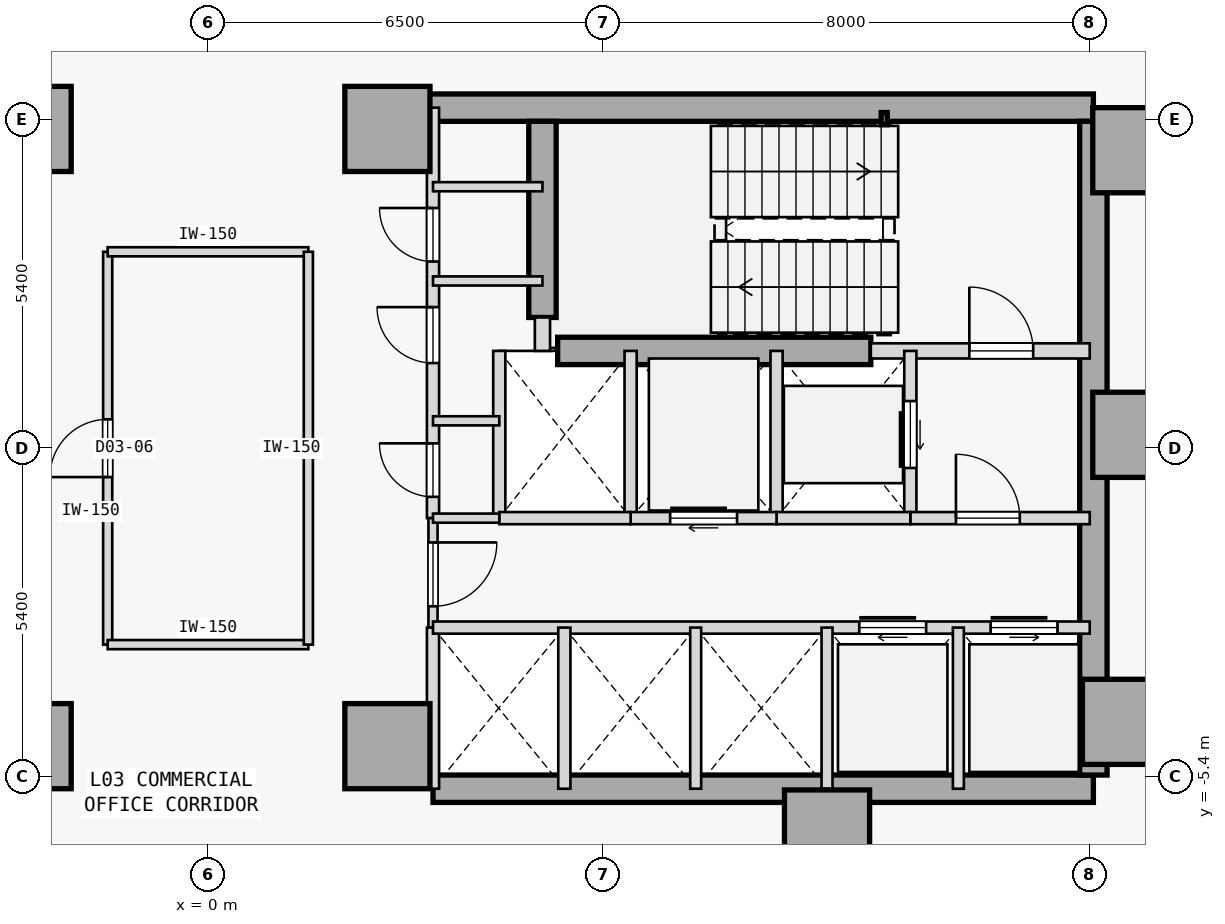
"""IFC4 building model, lengths in metres.
Left out: names, types, materials, properties, quantities, classifications, styles, units other than length and angle.
Written with IfcOpenShell. Run it as: python <this file> out.ifc"""

import sys

from ifc_helpers import new_model, si_unit, direction, frame, frame_2d, origin, origin_2d, place, context, subcontext, project, spatial, rectangle, hollow_rectangle, extrude, element, fill, save


model = new_model("IFC4")
c1 = context("Model", 3, precision=1e-05, world=origin(), true_north=direction((0.0, 1.0)))
c2 = subcontext(c1, "Body", "Model", "MODEL_VIEW")
j1 = project(units=[si_unit("LENGTHUNIT", "METRE"), si_unit("PLANEANGLEUNIT", "RADIAN")], contexts=[c1])
p1 = place(None, origin())
s1 = spatial("IfcSite", under=j1, at=p1, CompositionType="ELEMENT")
p2 = place(p1, origin())
s2 = spatial("IfcBuilding", under=s1, at=p2, CompositionType="ELEMENT")
p3 = place(p2, frame((0.0, 0.0, 18.0)))
s3 = spatial("IfcBuildingStorey", under=s2, at=p3, CompositionType="ELEMENT", Elevation=18.0)
for number, where, z_axis, x_axis in (
    (1, (-2.95, -4.9, 0.0), (0.0, 0.0, 1.0), (1.0, 0.0, 0.0)),
    (2, (-2.95, 5.25, 0.0), (0.0, 0.0, 1.0), (1.0, 0.0, 0.0)),
    (3, (15.25, 4.9, 0.0), (0.0, 0.0, 1.0), (1.0, 0.0, 0.0)),
    (4, (15.25, 0.22, 0.0), (0.0, 0.0, 1.0), (1.0, 0.0, 0.0)),
    (5, (15.08, -4.5, 0.0), (0.0, 0.0, 1.0), (1.0, 0.0, 0.0)),
    (6, (10.18, -6.32, 0.0), (0.0, 0.0, 1.0), (1.0, 0.0, 0.0)),
    (7, (2.95, -4.9, 0.0), (0.0, 0.0, 1.0), (1.0, 0.0, 0.0)),
    (8, (2.95, 5.25, 0.0), (0.0, 0.0, 1.0), (1.0, 0.0, 0.0)),
):
    element("IfcColumn", number, at=place(p3, frame(where, z_axis=z_axis, x_axis=x_axis)), inside=s3, PredefinedType="COLUMN", context=c2, shape_type="SweptSolid", body=[
        extrude(rectangle(XDim=1.4, YDim=1.4, at=origin_2d()), origin(), (0.0, 0.0, 1.0), 3.8),
    ])
p4 = place(p3, frame((3.15, 5.6, 0.0), z_axis=(0.0, 0.0, 1.0), x_axis=(1.0, 0.0, 0.0)))
e9 = element("IfcWall", 9, at=p4, inside=s3, PredefinedType="SHEAR", context=c2, shape_type="SweptSolid", body=[
    extrude(rectangle(XDim=11.41, YDim=0.45, at=frame_2d((5.705, 0.0))), origin(), (0.0, 0.0, 1.0), 3.575),
])
p5 = place(p3, frame((3.7, -5.6, 0.0), z_axis=(0.0, 0.0, 1.0), x_axis=(1.0, 0.0, 0.0)))
e10 = element("IfcWall", 10, at=p5, inside=s3, PredefinedType="SHEAR", context=c2, shape_type="SweptSolid", body=[
    extrude(rectangle(XDim=10.86, YDim=0.45, at=frame_2d((5.43, 0.0))), origin(), (0.0, 0.0, 1.0), 3.575),
])
p6 = place(p3, frame((14.56, -5.375, 0.0), z_axis=(0.0, 0.0, 1.0), x_axis=(0.0, 1.0, 0.0)))
e11 = element("IfcWall", 11, at=p6, inside=s3, PredefinedType="SHEAR", context=c2, shape_type="SweptSolid", body=[
    extrude(rectangle(XDim=10.75, YDim=0.45, at=frame_2d((5.375, 0.0))), origin(), (0.0, 0.0, 1.0), 3.575),
])
p7 = place(p3, frame((5.5, 2.15, 0.0), z_axis=(0.0, 0.0, 1.0), x_axis=(0.0, 1.0, 0.0)))
e12 = element("IfcWall", 12, at=p7, inside=s3, PredefinedType="SHEAR", context=c2, shape_type="SweptSolid", body=[
    extrude(rectangle(XDim=3.225, YDim=0.45, at=frame_2d((1.613, 0.0))), origin(), (0.0, 0.0, 1.0), 3.575),
])
p8 = place(p3, frame((5.75, 1.6, 0.0), z_axis=(0.0, 0.0, 1.0), x_axis=(1.0, 0.0, 0.0)))
e13 = element("IfcWall", 13, at=p8, inside=s3, PredefinedType="SHEAR", context=c2, shape_type="SweptSolid", body=[
    extrude(rectangle(XDim=5.15, YDim=0.45, at=frame_2d((2.575, 0.0))), origin(), (0.0, 0.0, 1.0), 3.575),
])
p9 = place(p3, frame((11.12, 5.42, 0.0), z_axis=(0.0, 0.0, 1.0), x_axis=(1.0, 0.0, 0.0)))
e14 = element("IfcColumn", 14, at=p9, inside=s3, PredefinedType="COLUMN", context=c2, shape_type="SweptSolid", body=[
    extrude(hollow_rectangle(XDim=0.1, YDim=0.2, WallThickness=0.008, at=origin_2d()), origin(), (0.0, 0.0, 1.0), 3.8),
])
p10 = place(p3, frame((10.9, 1.6, 0.0), z_axis=(0.0, 0.0, 1.0), x_axis=(1.0, 0.0, 0.0)))
e15 = element("IfcWall", 15, at=p10, inside=s3, PredefinedType="STANDARD", context=c2, shape_type="SweptSolid", body=[
    extrude(rectangle(XDim=3.6, YDim=0.25, at=frame_2d((1.8, 0.0))), origin(), (0.0, 0.0, 1.0), 3.575),
])
p11 = place(p10, frame((1.62, 0.0, 0.0)))
e16 = element("IfcOpeningElement", 16, at=p11, cuts=e15, PredefinedType="OPENING", context=c2, shape_type="SweptSolid", body=[
    extrude(rectangle(XDim=1.05, YDim=2.15, at=frame_2d((0.525, 1.075))), frame((0.0, 0.135, 0.0), z_axis=(0.0, -1.0, 0.0), x_axis=(1.0, 0.0, 0.0)), (0.0, 0.0, 1.0), 0.27),
])
p12 = place(p3, frame((5.5, 1.6, 0.0), z_axis=(0.0, 0.0, 1.0), x_axis=(0.0, 1.0, 0.0)))
e17 = element("IfcWall", 17, at=p12, inside=s3, PredefinedType="STANDARD", context=c2, shape_type="SweptSolid", body=[
    extrude(rectangle(XDim=0.55, YDim=0.25, at=frame_2d((0.275, 0.0))), origin(), (0.0, 0.0, 1.0), 3.575),
])
p13 = place(p3, frame((3.7, -1.15, 0.0), z_axis=(0.0, 0.0, 1.0), x_axis=(0.0, 1.0, 0.0)))
e18 = element("IfcWall", 18, at=p13, inside=s3, PredefinedType="STANDARD", context=c2, shape_type="SweptSolid", body=[
    extrude(rectangle(XDim=6.75, YDim=0.2, at=frame_2d((3.375, 0.0))), origin(), (0.0, 0.0, 1.0), 3.575),
])
p14 = place(p13, frame((0.35, 0.0, 0.0)))
e19 = element("IfcOpeningElement", 19, at=p14, cuts=e18, PredefinedType="OPENING", context=c2, shape_type="SweptSolid", body=[
    extrude(rectangle(XDim=0.88, YDim=2.15, at=frame_2d((0.44, 1.075))), frame((0.0, 0.11, 0.0), z_axis=(0.0, -1.0, 0.0), x_axis=(1.0, 0.0, 0.0)), (0.0, 0.0, 1.0), 0.22),
])
p15 = place(p13, frame((2.55, 0.0, 0.0)))
e20 = element("IfcOpeningElement", 20, at=p15, cuts=e18, PredefinedType="OPENING", context=c2, shape_type="SweptSolid", body=[
    extrude(rectangle(XDim=0.92, YDim=2.15, at=frame_2d((0.46, 1.075))), frame((0.0, 0.11, 0.0), z_axis=(0.0, -1.0, 0.0), x_axis=(1.0, 0.0, 0.0)), (0.0, 0.0, 1.0), 0.22),
])
p16 = place(p13, frame((4.22, 0.0, 0.0)))
e21 = element("IfcOpeningElement", 21, at=p16, cuts=e18, PredefinedType="OPENING", context=c2, shape_type="SweptSolid", body=[
    extrude(rectangle(XDim=0.88, YDim=2.15, at=frame_2d((0.44, 1.075))), frame((0.0, 0.11, 0.0), z_axis=(0.0, -1.0, 0.0), x_axis=(1.0, 0.0, 0.0)), (0.0, 0.0, 1.0), 0.22),
])
p17 = place(p3, frame((3.7, -2.95, 0.0), z_axis=(0.0, 0.0, 1.0), x_axis=(0.0, 1.0, 0.0)))
e22 = element("IfcWall", 22, at=p17, inside=s3, PredefinedType="PARTITIONING", context=c2, shape_type="SweptSolid", body=[
    extrude(rectangle(XDim=1.8, YDim=0.15, at=frame_2d((0.9, 0.0))), origin(), (0.0, 0.0, 1.0), 3.575),
])
p18 = place(p17, frame((0.35, 0.0, 0.0)))
e23 = element("IfcOpeningElement", 23, at=p18, cuts=e22, PredefinedType="OPENING", context=c2, shape_type="SweptSolid", body=[
    extrude(rectangle(XDim=1.05, YDim=2.18, at=frame_2d((0.525, 1.09))), frame((0.0, 0.085, 0.0), z_axis=(0.0, -1.0, 0.0), x_axis=(1.0, 0.0, 0.0)), (0.0, 0.0, 1.0), 0.17),
])
p19 = place(p3, frame((3.7, -5.6, 0.0), z_axis=(0.0, 0.0, 1.0), x_axis=(0.0, 1.0, 0.0)))
e24 = element("IfcWall", 24, at=p19, inside=s3, PredefinedType="STANDARD", context=c2, shape_type="SweptSolid", body=[
    extrude(rectangle(XDim=2.65, YDim=0.2, at=frame_2d((1.325, 0.0))), origin(), (0.0, 0.0, 1.0), 3.575),
])
p20 = place(p3, frame((11.55, -1.15, 0.0), z_axis=(0.0, 0.0, 1.0), x_axis=(0.0, 1.0, 0.0)))
e25 = element("IfcWall", 25, at=p20, inside=s3, PredefinedType="STANDARD", context=c2, shape_type="SweptSolid", body=[
    extrude(rectangle(XDim=2.75, YDim=0.2, at=frame_2d((1.375, 0.0))), origin(), (0.0, 0.0, 1.0), 3.575),
])
p21 = place(p20, frame((0.825, 0.0, 0.0)))
e26 = element("IfcOpeningElement", 26, at=p21, cuts=e25, PredefinedType="OPENING", context=c2, shape_type="SweptSolid", body=[
    extrude(rectangle(XDim=1.1, YDim=2.15, at=frame_2d((0.55, 1.075))), frame((0.0, 0.11, 0.0), z_axis=(0.0, -1.0, 0.0), x_axis=(1.0, 0.0, 0.0)), (0.0, 0.0, 1.0), 0.22),
])
p22 = place(p3, frame((9.35, -1.15, 0.0), z_axis=(0.0, 0.0, 1.0), x_axis=(0.0, 1.0, 0.0)))
e27 = element("IfcWall", 27, at=p22, inside=s3, PredefinedType="STANDARD", context=c2, shape_type="SweptSolid", body=[
    extrude(rectangle(XDim=2.75, YDim=0.2, at=frame_2d((1.375, 0.0))), origin(), (0.0, 0.0, 1.0), 3.575),
])
p23 = place(p3, frame((11.55, -1.15, 0.0), z_axis=(0.0, 0.0, 1.0), x_axis=(1.0, 0.0, 0.0)))
e28 = element("IfcWall", 28, at=p23, inside=s3, PredefinedType="STANDARD", context=c2, shape_type="SweptSolid", body=[
    extrude(rectangle(XDim=2.95, YDim=0.2, at=frame_2d((1.475, 0.0))), origin(), (0.0, 0.0, 1.0), 3.575),
])
p24 = place(p23, frame((0.75, 0.0, 0.0)))
e29 = element("IfcOpeningElement", 29, at=p24, cuts=e28, PredefinedType="OPENING", context=c2, shape_type="SweptSolid", body=[
    extrude(rectangle(XDim=1.05, YDim=2.18, at=frame_2d((0.525, 1.09))), frame((0.0, 0.11, 0.0), z_axis=(0.0, -1.0, 0.0), x_axis=(1.0, 0.0, 0.0)), (0.0, 0.0, 1.0), 0.22),
])
p25 = place(p3, frame((9.35, -1.15, 0.0), z_axis=(0.0, 0.0, 1.0), x_axis=(1.0, 0.0, 0.0)))
e30 = element("IfcWall", 30, at=p25, inside=s3, PredefinedType="STANDARD", context=c2, shape_type="SweptSolid", body=[
    extrude(rectangle(XDim=2.2, YDim=0.2, at=frame_2d((1.1, 0.0))), origin(), (0.0, 0.0, 1.0), 3.575),
])
p26 = place(p3, frame((6.95, -1.15, 0.0), z_axis=(0.0, 0.0, 1.0), x_axis=(0.0, 1.0, 0.0)))
e31 = element("IfcWall", 31, at=p26, inside=s3, PredefinedType="STANDARD", context=c2, shape_type="SweptSolid", body=[
    extrude(rectangle(XDim=2.75, YDim=0.2, at=frame_2d((1.375, 0.0))), origin(), (0.0, 0.0, 1.0), 3.575),
])
p27 = place(p3, frame((6.95, -1.15, 0.0), z_axis=(0.0, 0.0, 1.0), x_axis=(1.0, 0.0, 0.0)))
e32 = element("IfcWall", 32, at=p27, inside=s3, PredefinedType="STANDARD", context=c2, shape_type="SweptSolid", body=[
    extrude(rectangle(XDim=2.4, YDim=0.2, at=frame_2d((1.2, 0.0))), origin(), (0.0, 0.0, 1.0), 3.575),
])
p28 = place(p27, frame((0.65, 0.0, 0.0)))
e33 = element("IfcOpeningElement", 33, at=p28, cuts=e32, PredefinedType="OPENING", context=c2, shape_type="SweptSolid", body=[
    extrude(rectangle(XDim=1.1, YDim=2.15, at=frame_2d((0.55, 1.075))), frame((0.0, 0.11, 0.0), z_axis=(0.0, -1.0, 0.0), x_axis=(1.0, 0.0, 0.0)), (0.0, 0.0, 1.0), 0.22),
])
p29 = place(p3, frame((4.79, -1.15, 0.0), z_axis=(0.0, 0.0, 1.0), x_axis=(0.0, 1.0, 0.0)))
e34 = element("IfcWall", 34, at=p29, inside=s3, PredefinedType="STANDARD", context=c2, shape_type="SweptSolid", body=[
    extrude(rectangle(XDim=2.75, YDim=0.2, at=frame_2d((1.375, 0.0))), origin(), (0.0, 0.0, 1.0), 3.575),
])
p30 = place(p3, frame((4.79, -1.15, 0.0), z_axis=(0.0, 0.0, 1.0), x_axis=(1.0, 0.0, 0.0)))
e35 = element("IfcWall", 35, at=p30, inside=s3, PredefinedType="STANDARD", context=c2, shape_type="SweptSolid", body=[
    extrude(rectangle(XDim=2.16, YDim=0.2, at=frame_2d((1.08, 0.0))), origin(), (0.0, 0.0, 1.0), 3.575),
])
p31 = place(p3, frame((3.7, -1.15, 0.0), z_axis=(0.0, 0.0, 1.0), x_axis=(1.0, 0.0, 0.0)))
e36 = element("IfcWall", 36, at=p31, inside=s3, PredefinedType="PARTITIONING", context=c2, shape_type="SweptSolid", body=[
    extrude(rectangle(XDim=1.09, YDim=0.15, at=frame_2d((0.545, 0.0))), origin(), (0.0, 0.0, 1.0), 3.575),
])
p32 = place(p3, frame((3.7, -2.95, 0.0), z_axis=(0.0, 0.0, 1.0), x_axis=(1.0, 0.0, 0.0)))
e37 = element("IfcWall", 37, at=p32, inside=s3, PredefinedType="STANDARD", context=c2, shape_type="SweptSolid", body=[
    extrude(rectangle(XDim=10.8, YDim=0.2, at=frame_2d((5.4, 0.0))), origin(), (0.0, 0.0, 1.0), 3.575),
])
p33 = place(p32, frame((7.01, 0.0, 0.0)))
e38 = element("IfcOpeningElement", 38, at=p33, cuts=e37, PredefinedType="OPENING", context=c2, shape_type="SweptSolid", body=[
    extrude(rectangle(XDim=1.1, YDim=2.15, at=frame_2d((0.55, 1.075))), frame((0.0, 0.11, 0.0), z_axis=(0.0, -1.0, 0.0), x_axis=(1.0, 0.0, 0.0)), (0.0, 0.0, 1.0), 0.22),
])
p34 = place(p32, frame((9.17, 0.0, 0.0)))
e39 = element("IfcOpeningElement", 39, at=p34, cuts=e37, PredefinedType="OPENING", context=c2, shape_type="SweptSolid", body=[
    extrude(rectangle(XDim=1.1, YDim=2.15, at=frame_2d((0.55, 1.075))), frame((0.0, 0.11, 0.0), z_axis=(0.0, -1.0, 0.0), x_axis=(1.0, 0.0, 0.0)), (0.0, 0.0, 1.0), 0.22),
])
p35 = place(p3, frame((5.86, -5.6, 0.0), z_axis=(0.0, 0.0, 1.0), x_axis=(0.0, 1.0, 0.0)))
e40 = element("IfcWall", 40, at=p35, inside=s3, PredefinedType="STANDARD", context=c2, shape_type="SweptSolid", body=[
    extrude(rectangle(XDim=2.65, YDim=0.2, at=frame_2d((1.325, 0.0))), origin(), (0.0, 0.0, 1.0), 3.575),
])
for number, where, z_axis, x_axis in (
    (41, (12.34, -5.6, 0.0), (0.0, 0.0, 1.0), (0.0, 1.0, 0.0)),
    (42, (10.18, -5.6, 0.0), (0.0, 0.0, 1.0), (0.0, 1.0, 0.0)),
    (43, (8.02, -5.6, 0.0), (0.0, 0.0, 1.0), (0.0, 1.0, 0.0)),
):
    element("IfcWall", number, at=place(p3, frame(where, z_axis=z_axis, x_axis=x_axis)), inside=s3, PredefinedType="STANDARD", context=c2, shape_type="SweptSolid", body=[
        extrude(rectangle(XDim=2.65, YDim=0.18, at=frame_2d((1.325, 0.0))), origin(), (0.0, 0.0, 1.0), 3.575),
    ])
p36 = place(p3, frame((3.7, 4.3, 0.0), z_axis=(0.0, 0.0, 1.0), x_axis=(1.0, 0.0, 0.0)))
e44 = element("IfcWall", 44, at=p36, inside=s3, PredefinedType="PARTITIONING", context=c2, shape_type="SweptSolid", body=[
    extrude(rectangle(XDim=1.8, YDim=0.15, at=frame_2d((0.9, 0.0))), origin(), (0.0, 0.0, 1.0), 3.575),
])
p37 = place(p3, frame((3.7, 0.45, 0.0), z_axis=(0.0, 0.0, 1.0), x_axis=(1.0, 0.0, 0.0)))
e45 = element("IfcWall", 45, at=p37, inside=s3, PredefinedType="PARTITIONING", context=c2, shape_type="SweptSolid", body=[
    extrude(rectangle(XDim=1.09, YDim=0.15, at=frame_2d((0.545, 0.0))), origin(), (0.0, 0.0, 1.0), 3.575),
])
p38 = place(p3, frame((3.7, 2.75, 0.0), z_axis=(0.0, 0.0, 1.0), x_axis=(1.0, 0.0, 0.0)))
e46 = element("IfcWall", 46, at=p38, inside=s3, PredefinedType="PARTITIONING", context=c2, shape_type="SweptSolid", body=[
    extrude(rectangle(XDim=1.8, YDim=0.15, at=frame_2d((0.9, 0.0))), origin(), (0.0, 0.0, 1.0), 3.575),
])
p39 = place(p3, frame((-1.65, -3.23, 0.0), z_axis=(0.0, 0.0, 1.0), x_axis=(0.0, 1.0, 0.0)))
e47 = element("IfcWall", 47, at=p39, inside=s3, PredefinedType="PARTITIONING", context=c2, shape_type="SweptSolid", body=[
    extrude(rectangle(XDim=6.46, YDim=0.15, at=frame_2d((3.23, 0.0))), origin(), (0.0, 0.0, 1.0), 3.575),
])
p40 = place(p39, frame((2.755, 0.0, 0.0)))
e48 = element("IfcOpeningElement", 48, at=p40, cuts=e47, PredefinedType="OPENING", context=c2, shape_type="SweptSolid", body=[
    extrude(rectangle(XDim=0.95, YDim=2.15, at=frame_2d((0.475, 1.075))), frame((0.0, 0.085, 0.0), z_axis=(0.0, -1.0, 0.0), x_axis=(1.0, 0.0, 0.0)), (0.0, 0.0, 1.0), 0.17),
])
for number, where, z_axis, x_axis in (
    (49, (-1.65, -3.23, 0.0), (0.0, 0.0, 1.0), (1.0, 0.0, 0.0)),
    (50, (-1.65, 3.23, 0.0), (0.0, 0.0, 1.0), (1.0, 0.0, 0.0)),
):
    element("IfcWall", number, at=place(p3, frame(where, z_axis=z_axis, x_axis=x_axis)), inside=s3, PredefinedType="PARTITIONING", context=c2, shape_type="SweptSolid", body=[
        extrude(rectangle(XDim=3.3, YDim=0.15, at=frame_2d((1.65, 0.0))), origin(), (0.0, 0.0, 1.0), 3.575),
    ])
p41 = place(p3, frame((1.65, -3.23, 0.0), z_axis=(0.0, 0.0, 1.0), x_axis=(0.0, 1.0, 0.0)))
e51 = element("IfcWall", 51, at=p41, inside=s3, PredefinedType="PARTITIONING", context=c2, shape_type="SweptSolid", body=[
    extrude(rectangle(XDim=6.46, YDim=0.15, at=frame_2d((3.23, 0.0))), origin(), (0.0, 0.0, 1.0), 3.575),
])
p42 = place(p11, origin())
e52 = element("IfcDoor", 52, at=p42, inside=s3, OperationType="SINGLE_SWING_LEFT", PredefinedType="DOOR", context=c2, shape_type="SweptSolid", body=[
    extrude(rectangle(XDim=1.05, YDim=2.15, at=frame_2d((0.525, 1.075))), frame((0.0, 0.025, 0.0), z_axis=(0.0, -1.0, 0.0), x_axis=(1.0, 0.0, 0.0)), (0.0, 0.0, 1.0), 0.05),
])
fill(e16, e52)
p43 = place(p24, origin())
e53 = element("IfcDoor", 53, at=p43, inside=s3, OperationType="SINGLE_SWING_LEFT", PredefinedType="DOOR", context=c2, shape_type="SweptSolid", body=[
    extrude(rectangle(XDim=1.05, YDim=2.18, at=frame_2d((0.525, 1.09))), frame((0.0, 0.025, 0.0), z_axis=(0.0, -1.0, 0.0), x_axis=(1.0, 0.0, 0.0)), (0.0, 0.0, 1.0), 0.05),
])
fill(e29, e53)
p44 = place(p18, frame((1.05, 0.0, 0.0), z_axis=(0.0, 0.0, 1.0), x_axis=(-1.0, 0.0, 0.0)))
e54 = element("IfcDoor", 54, at=p44, inside=s3, OperationType="SINGLE_SWING_RIGHT", PredefinedType="DOOR", context=c2, shape_type="SweptSolid", body=[
    extrude(rectangle(XDim=1.05, YDim=2.18, at=frame_2d((0.525, 1.09))), frame((0.0, 0.025, 0.0), z_axis=(0.0, -1.0, 0.0), x_axis=(1.0, 0.0, 0.0)), (0.0, 0.0, 1.0), 0.05),
])
fill(e23, e54)
p45 = place(p21, origin())
e55 = element("IfcDoor", 55, at=p45, inside=s3, OperationType="SLIDING_TO_RIGHT", PredefinedType="DOOR", context=c2, shape_type="SweptSolid", body=[
    extrude(rectangle(XDim=1.1, YDim=2.15, at=frame_2d((0.55, 1.075))), frame((0.0, 0.025, 0.0), z_axis=(0.0, -1.0, 0.0), x_axis=(1.0, 0.0, 0.0)), (0.0, 0.0, 1.0), 0.05),
])
fill(e26, e55)
p46 = place(p28, origin())
e56 = element("IfcDoor", 56, at=p46, inside=s3, OperationType="SLIDING_TO_RIGHT", PredefinedType="DOOR", context=c2, shape_type="SweptSolid", body=[
    extrude(rectangle(XDim=1.1, YDim=2.15, at=frame_2d((0.55, 1.075))), frame((0.0, 0.025, 0.0), z_axis=(0.0, -1.0, 0.0), x_axis=(1.0, 0.0, 0.0)), (0.0, 0.0, 1.0), 0.05),
])
fill(e33, e56)
p47 = place(p33, origin())
e57 = element("IfcDoor", 57, at=p47, inside=s3, OperationType="SLIDING_TO_RIGHT", PredefinedType="DOOR", context=c2, shape_type="SweptSolid", body=[
    extrude(rectangle(XDim=1.1, YDim=2.15, at=frame_2d((0.55, 1.075))), frame((0.0, 0.025, 0.0), z_axis=(0.0, -1.0, 0.0), x_axis=(1.0, 0.0, 0.0)), (0.0, 0.0, 1.0), 0.05),
])
fill(e38, e57)
p48 = place(p34, origin())
e58 = element("IfcDoor", 58, at=p48, inside=s3, OperationType="SLIDING_TO_LEFT", PredefinedType="DOOR", context=c2, shape_type="SweptSolid", body=[
    extrude(rectangle(XDim=1.1, YDim=2.15, at=frame_2d((0.55, 1.075))), frame((0.0, 0.025, 0.0), z_axis=(0.0, -1.0, 0.0), x_axis=(1.0, 0.0, 0.0)), (0.0, 0.0, 1.0), 0.05),
])
fill(e39, e58)
p49 = place(p14, origin())
e59 = element("IfcDoor", 59, at=p49, inside=s3, OperationType="SINGLE_SWING_RIGHT", PredefinedType="DOOR", context=c2, shape_type="SweptSolid", body=[
    extrude(rectangle(XDim=0.88, YDim=2.15, at=frame_2d((0.44, 1.075))), frame((0.0, 0.025, 0.0), z_axis=(0.0, -1.0, 0.0), x_axis=(1.0, 0.0, 0.0)), (0.0, 0.0, 1.0), 0.05),
])
fill(e19, e59)
p50 = place(p15, origin())
e60 = element("IfcDoor", 60, at=p50, inside=s3, OperationType="SINGLE_SWING_RIGHT", PredefinedType="DOOR", context=c2, shape_type="SweptSolid", body=[
    extrude(rectangle(XDim=0.92, YDim=2.15, at=frame_2d((0.46, 1.075))), frame((0.0, 0.025, 0.0), z_axis=(0.0, -1.0, 0.0), x_axis=(1.0, 0.0, 0.0)), (0.0, 0.0, 1.0), 0.05),
])
fill(e20, e60)
p51 = place(p16, origin())
e61 = element("IfcDoor", 61, at=p51, inside=s3, OperationType="SINGLE_SWING_RIGHT", PredefinedType="DOOR", context=c2, shape_type="SweptSolid", body=[
    extrude(rectangle(XDim=0.88, YDim=2.15, at=frame_2d((0.44, 1.075))), frame((0.0, 0.025, 0.0), z_axis=(0.0, -1.0, 0.0), x_axis=(1.0, 0.0, 0.0)), (0.0, 0.0, 1.0), 0.05),
])
fill(e21, e61)
p52 = place(p40, origin())
e62 = element("IfcDoor", 62, at=p52, inside=s3, OperationType="SINGLE_SWING_LEFT", PredefinedType="DOOR", context=c2, shape_type="SweptSolid", body=[
    extrude(rectangle(XDim=0.95, YDim=2.15, at=frame_2d((0.475, 1.075))), frame((0.0, 0.025, 0.0), z_axis=(0.0, -1.0, 0.0), x_axis=(1.0, 0.0, 0.0)), (0.0, 0.0, 1.0), 0.05),
])
fill(e48, e62)
save(model, sys.argv[1])
